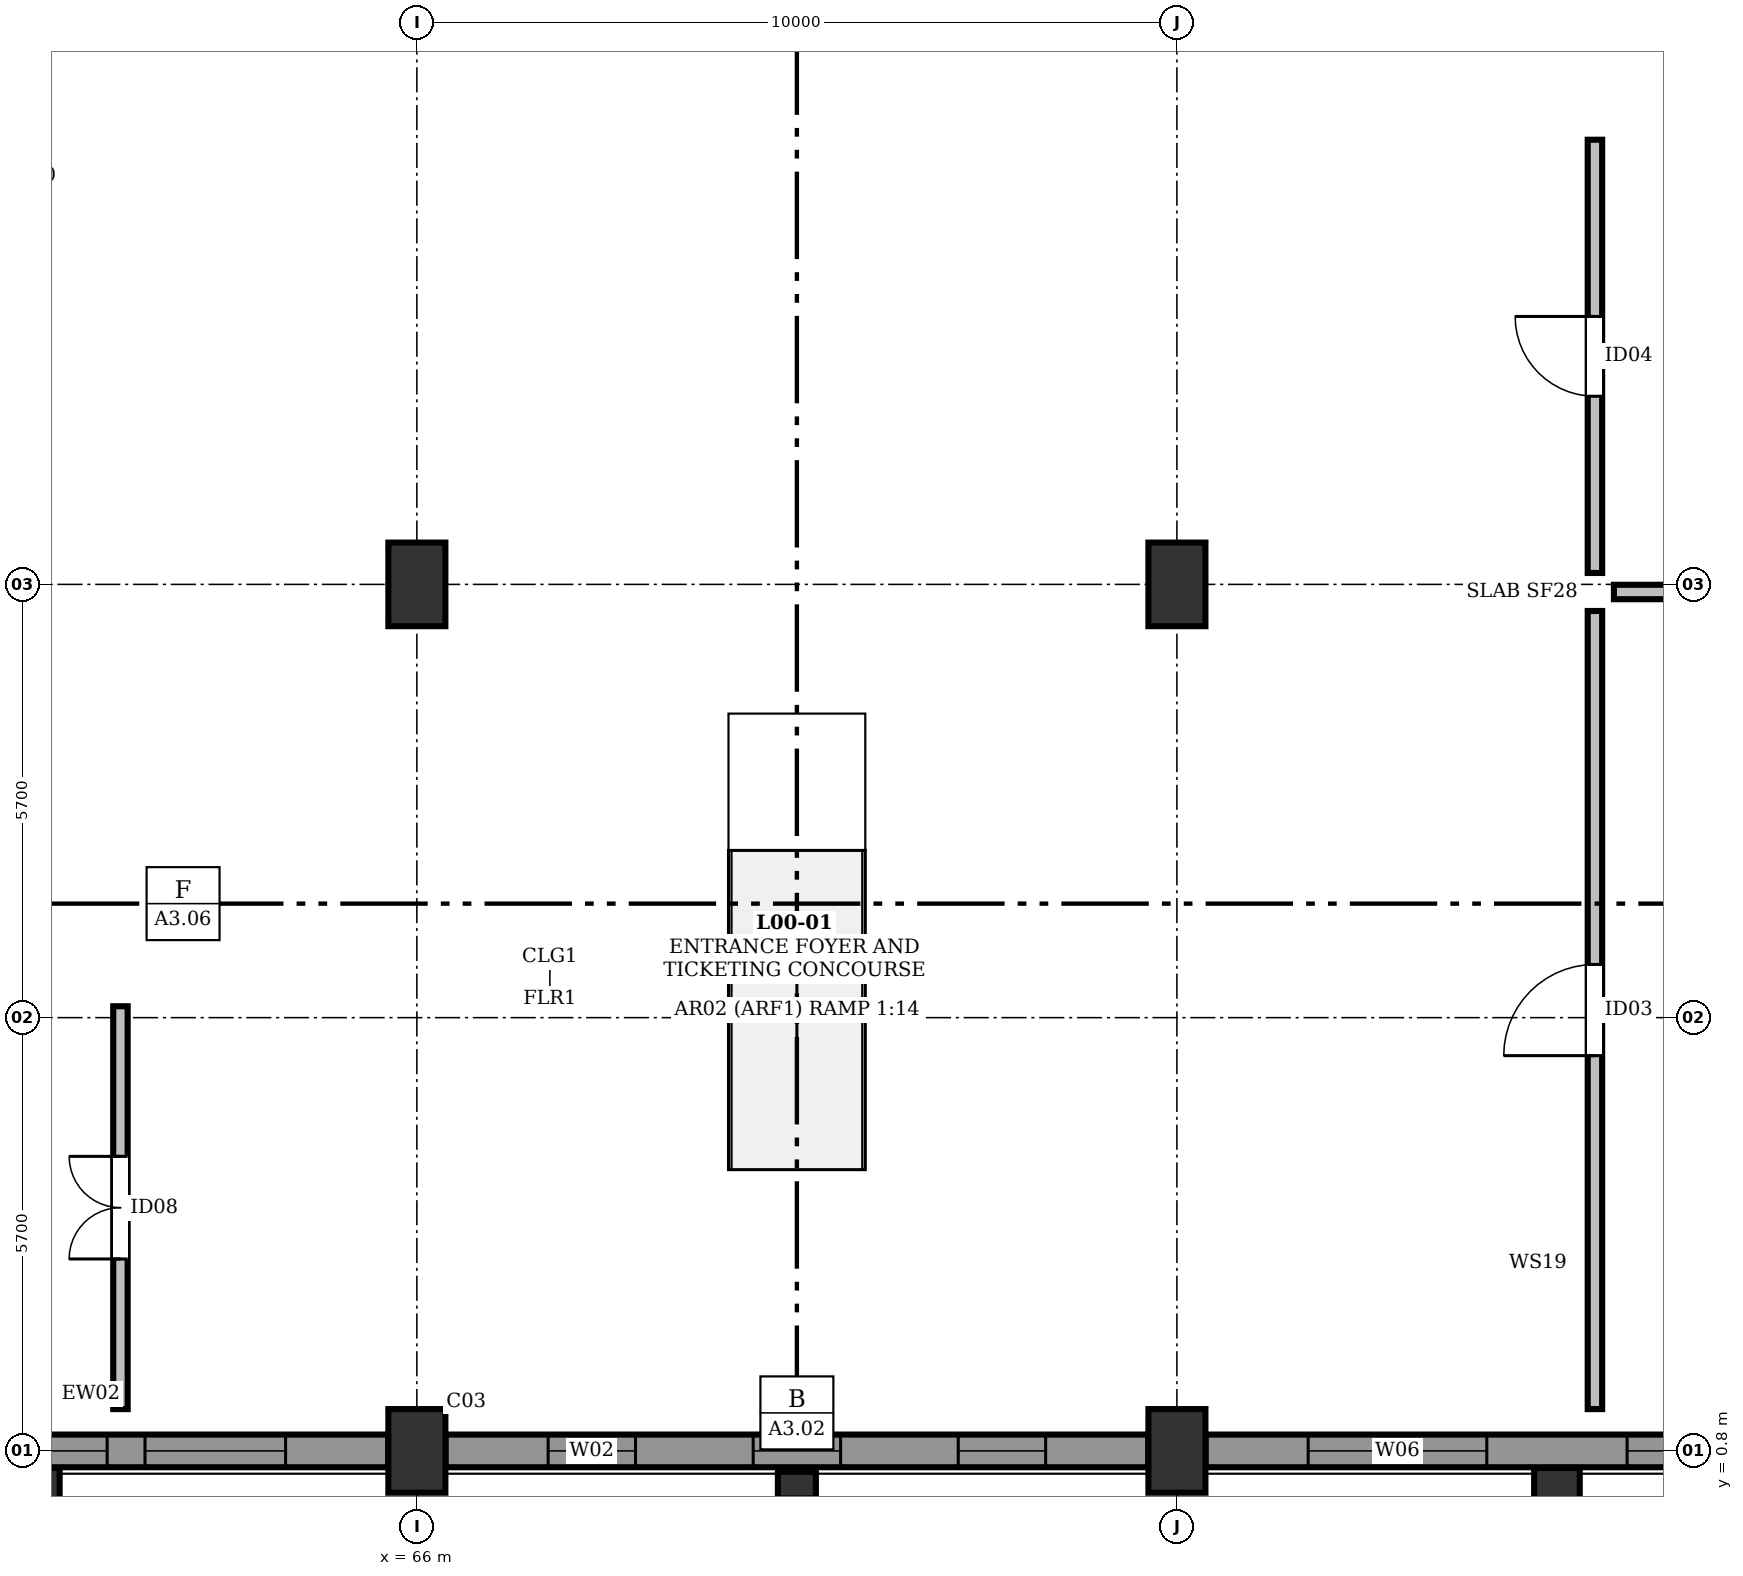
"""IFC4 building model, lengths in metres.
Left out: names, types, materials, properties, quantities, classifications, styles, units other than length and angle.
Written with IfcOpenShell. Run it as: python <this file> out.ifc"""

import sys

from ifc_helpers import new_model, si_unit, direction, frame, frame_2d, origin, origin_2d, place, context, subcontext, project, spatial, rectangle, extrude, element, fill, save


model = new_model("IFC4")
c1 = context("Model", 3, precision=1e-05, world=origin(), true_north=direction((0.0, 1.0)))
c2 = subcontext(c1, "Body", "Model", "MODEL_VIEW")
j1 = project(units=[si_unit("LENGTHUNIT", "METRE"), si_unit("PLANEANGLEUNIT", "RADIAN")], contexts=[c1])
p1 = place(None, origin())
s1 = spatial("IfcSite", under=j1, at=p1, CompositionType="ELEMENT")
p2 = place(p1, origin())
s2 = spatial("IfcBuilding", under=s1, at=p2, CompositionType="ELEMENT")
p3 = place(p2, origin())
s3 = spatial("IfcBuildingStorey", under=s2, at=p3, CompositionType="ELEMENT", Elevation=0.0)
for number, where, z_axis, x_axis in (
    (1, (66.0, 0.8, 0.0), (0.0, 0.0, 1.0), (1.0, 0.0, 0.0)),
    (2, (66.0, 12.2, 0.0), (0.0, 0.0, 1.0), (1.0, 0.0, 0.0)),
    (3, (76.0, 0.8, 0.0), (0.0, 0.0, 1.0), (1.0, 0.0, 0.0)),
    (4, (76.0, 12.2, 0.0), (0.0, 0.0, 1.0), (1.0, 0.0, 0.0)),
):
    element("IfcColumn", number, at=place(p3, frame(where, z_axis=z_axis, x_axis=x_axis)), inside=s3, PredefinedType="COLUMN", context=c2, shape_type="SweptSolid", body=[
        extrude(rectangle(XDim=0.75, YDim=1.1, at=origin_2d()), origin(), (0.0, 0.0, 1.0), 5.4),
    ])
p4 = place(p3, frame((61.0, 0.35, 0.0), z_axis=(0.0, 0.0, 1.0), x_axis=(0.0, 1.0, 0.0)))
e5 = element("IfcColumn", 5, at=p4, inside=s3, PredefinedType="PILASTER", context=c2, shape_type="SweptSolid", body=[
    extrude(rectangle(XDim=0.45, YDim=0.6, at=origin_2d()), origin(), (0.0, 0.0, 1.0), 5.4),
])
p5 = place(p3, frame((71.0, 0.35, 0.0), z_axis=(0.0, 0.0, 1.0), x_axis=(0.0, 1.0, 0.0)))
e6 = element("IfcColumn", 6, at=p5, inside=s3, PredefinedType="PILASTER", context=c2, shape_type="SweptSolid", body=[
    extrude(rectangle(XDim=0.35, YDim=0.5, at=origin_2d()), origin(), (0.0, 0.0, 1.0), 5.4),
])
p6 = place(p3, frame((81.0, 0.35, 0.0), z_axis=(0.0, 0.0, 1.0), x_axis=(0.0, 1.0, 0.0)))
e7 = element("IfcColumn", 7, at=p6, inside=s3, PredefinedType="PILASTER", context=c2, shape_type="SweptSolid", body=[
    extrude(rectangle(XDim=0.45, YDim=0.6, at=origin_2d()), origin(), (0.0, 0.0, 1.0), 5.4),
])
p7 = place(p3, frame((56.377, 0.8, 0.0), z_axis=(0.0, 0.0, 1.0), x_axis=(1.0, 0.0, 0.0)))
e8 = element("IfcWall", 8, at=p7, inside=s3, PredefinedType="STANDARD", context=c2, shape_type="SweptSolid", body=[
    extrude(rectangle(XDim=9.246, YDim=0.43, at=frame_2d((4.623, 0.0))), origin(), (0.0, 0.0, 1.0), 4.612),
])
p8 = place(p7, frame((1.35, 0.0, 0.75)))
e9 = element("IfcOpeningElement", 9, at=p8, cuts=e8, PredefinedType="OPENING", context=c2, shape_type="SweptSolid", body=[
    extrude(rectangle(XDim=1.85, YDim=2.5, at=frame_2d((0.925, 1.25))), frame((0.0, 0.227, 0.0), z_axis=(0.0, -1.0, 0.0), x_axis=(1.0, 0.0, 0.0)), (0.0, 0.0, 1.0), 0.454),
])
p9 = place(p7, frame((3.698, 0.0, 0.75)))
e10 = element("IfcOpeningElement", 10, at=p9, cuts=e8, PredefinedType="OPENING", context=c2, shape_type="SweptSolid", body=[
    extrude(rectangle(XDim=1.85, YDim=2.5, at=frame_2d((0.925, 1.25))), frame((0.0, 0.227, 0.0), z_axis=(0.0, -1.0, 0.0), x_axis=(1.0, 0.0, 0.0)), (0.0, 0.0, 1.0), 0.454),
])
p10 = place(p7, frame((6.046, 0.0, 0.75)))
e11 = element("IfcOpeningElement", 11, at=p10, cuts=e8, PredefinedType="OPENING", context=c2, shape_type="SweptSolid", body=[
    extrude(rectangle(XDim=1.85, YDim=2.5, at=frame_2d((0.925, 1.25))), frame((0.0, 0.227, 0.0), z_axis=(0.0, -1.0, 0.0), x_axis=(1.0, 0.0, 0.0)), (0.0, 0.0, 1.0), 0.454),
])
p11 = place(p3, frame((66.377, 0.8, 0.0), z_axis=(0.0, 0.0, 1.0), x_axis=(1.0, 0.0, 0.0)))
e12 = element("IfcWall", 12, at=p11, inside=s3, PredefinedType="STANDARD", context=c2, shape_type="SweptSolid", body=[
    extrude(rectangle(XDim=9.246, YDim=0.43, at=frame_2d((4.623, 0.0))), origin(), (0.0, 0.0, 1.0), 4.612),
])
p12 = place(p11, frame((1.35, 0.0, 0.75)))
e13 = element("IfcOpeningElement", 13, at=p12, cuts=e12, PredefinedType="OPENING", context=c2, shape_type="SweptSolid", body=[
    extrude(rectangle(XDim=1.15, YDim=1.75, at=frame_2d((0.575, 0.875))), frame((0.0, 0.227, 0.0), z_axis=(0.0, -1.0, 0.0), x_axis=(1.0, 0.0, 0.0)), (0.0, 0.0, 1.0), 0.454),
])
p13 = place(p11, frame((4.048, 0.0, 0.75)))
e14 = element("IfcOpeningElement", 14, at=p13, cuts=e12, PredefinedType="OPENING", context=c2, shape_type="SweptSolid", body=[
    extrude(rectangle(XDim=1.15, YDim=1.75, at=frame_2d((0.575, 0.875))), frame((0.0, 0.227, 0.0), z_axis=(0.0, -1.0, 0.0), x_axis=(1.0, 0.0, 0.0)), (0.0, 0.0, 1.0), 0.454),
])
p14 = place(p11, frame((6.746, 0.0, 0.75)))
e15 = element("IfcOpeningElement", 15, at=p14, cuts=e12, PredefinedType="OPENING", context=c2, shape_type="SweptSolid", body=[
    extrude(rectangle(XDim=1.15, YDim=1.75, at=frame_2d((0.575, 0.875))), frame((0.0, 0.227, 0.0), z_axis=(0.0, -1.0, 0.0), x_axis=(1.0, 0.0, 0.0)), (0.0, 0.0, 1.0), 0.454),
])
p15 = place(p3, frame((76.377, 0.8, 0.0), z_axis=(0.0, 0.0, 1.0), x_axis=(1.0, 0.0, 0.0)))
e16 = element("IfcWall", 16, at=p15, inside=s3, PredefinedType="STANDARD", context=c2, shape_type="SweptSolid", body=[
    extrude(rectangle(XDim=9.246, YDim=0.43, at=frame_2d((4.623, 0.0))), origin(), (0.0, 0.0, 1.0), 4.612),
])
p16 = place(p15, frame((1.35, 0.0, 0.75)))
e17 = element("IfcOpeningElement", 17, at=p16, cuts=e16, PredefinedType="OPENING", context=c2, shape_type="SweptSolid", body=[
    extrude(rectangle(XDim=2.35, YDim=1.75, at=frame_2d((1.175, 0.875))), frame((0.0, 0.227, 0.0), z_axis=(0.0, -1.0, 0.0), x_axis=(1.0, 0.0, 0.0)), (0.0, 0.0, 1.0), 0.454),
])
p17 = place(p15, frame((5.546, 0.0, 0.75)))
e18 = element("IfcOpeningElement", 18, at=p17, cuts=e16, PredefinedType="OPENING", context=c2, shape_type="SweptSolid", body=[
    extrude(rectangle(XDim=2.35, YDim=1.75, at=frame_2d((1.175, 0.875))), frame((0.0, 0.227, 0.0), z_axis=(0.0, -1.0, 0.0), x_axis=(1.0, 0.0, 0.0)), (0.0, 0.0, 1.0), 0.454),
])
p18 = place(p3, frame((62.1, 1.35, 0.0), z_axis=(0.0, 0.0, 1.0), x_axis=(0.0, 1.0, 0.0)))
e19 = element("IfcWall", 19, at=p18, inside=s3, PredefinedType="SOLIDWALL", context=c2, shape_type="SweptSolid", body=[
    extrude(rectangle(XDim=5.3, YDim=0.19, at=frame_2d((2.65, 0.0))), origin(), (0.0, 0.0, 1.0), 5.16),
])
p19 = place(p18, frame((1.975, 0.0, 0.0)))
e20 = element("IfcOpeningElement", 20, at=p19, cuts=e19, PredefinedType="OPENING", context=c2, shape_type="SweptSolid", body=[
    extrude(rectangle(XDim=1.35, YDim=2.2, at=frame_2d((0.675, 1.1))), frame((0.0, 0.107, 0.0), z_axis=(0.0, -1.0, 0.0), x_axis=(1.0, 0.0, 0.0)), (0.0, 0.0, 1.0), 0.214),
])
p20 = place(p3, frame((81.5, 1.35, 0.0), z_axis=(0.0, 0.0, 1.0), x_axis=(0.0, 1.0, 0.0)))
e21 = element("IfcWall", 21, at=p20, inside=s3, PredefinedType="SOLIDWALL", context=c2, shape_type="SweptSolid", body=[
    extrude(rectangle(XDim=10.5, YDim=0.19, at=frame_2d((5.25, 0.0))), origin(), (0.0, 0.0, 1.0), 4.245),
])
p21 = place(p20, frame((4.65, 0.0, 0.0)))
e22 = element("IfcOpeningElement", 22, at=p21, cuts=e21, PredefinedType="OPENING", context=c2, shape_type="SweptSolid", body=[
    extrude(rectangle(XDim=1.2, YDim=2.15, at=frame_2d((0.6, 1.075))), frame((0.0, 0.107, 0.0), z_axis=(0.0, -1.0, 0.0), x_axis=(1.0, 0.0, 0.0)), (0.0, 0.0, 1.0), 0.214),
])
p22 = place(p3, frame((81.5, 12.35, 0.0), z_axis=(0.0, 0.0, 1.0), x_axis=(0.0, 1.0, 0.0)))
e23 = element("IfcWall", 23, at=p22, inside=s3, PredefinedType="SOLIDWALL", context=c2, shape_type="SweptSolid", body=[
    extrude(rectangle(XDim=5.7, YDim=0.19, at=frame_2d((2.85, 0.0))), origin(), (0.0, 0.0, 1.0), 4.245),
])
p23 = place(p22, frame((2.325, 0.0, 0.0)))
e24 = element("IfcOpeningElement", 24, at=p23, cuts=e23, PredefinedType="OPENING", context=c2, shape_type="SweptSolid", body=[
    extrude(rectangle(XDim=1.05, YDim=2.15, at=frame_2d((0.525, 1.075))), frame((0.0, 0.107, 0.0), z_axis=(0.0, -1.0, 0.0), x_axis=(1.0, 0.0, 0.0)), (0.0, 0.0, 1.0), 0.214),
])
p24 = place(p3, frame((81.75, 12.1, 0.0), z_axis=(0.0, 0.0, 1.0), x_axis=(1.0, 0.0, 0.0)))
e25 = element("IfcWall", 25, at=p24, inside=s3, PredefinedType="SOLIDWALL", context=c2, shape_type="SweptSolid", body=[
    extrude(rectangle(XDim=3.873, YDim=0.19, at=frame_2d((1.937, 0.0))), origin(), (0.0, 0.0, 1.0), 4.245),
])
p25 = place(p9, origin())
e26 = element("IfcWindow", 26, at=p25, inside=s3, PartitioningType="DOUBLE_PANEL_VERTICAL", PredefinedType="WINDOW", context=c2, shape_type="SweptSolid", body=[
    extrude(rectangle(XDim=1.85, YDim=2.5, at=frame_2d((0.925, 1.25))), frame((0.0, 0.08, 0.0), z_axis=(0.0, -1.0, 0.0), x_axis=(1.0, 0.0, 0.0)), (0.0, 0.0, 1.0), 0.06),
])
fill(e10, e26)
p26 = place(p10, origin())
e27 = element("IfcWindow", 27, at=p26, inside=s3, PartitioningType="DOUBLE_PANEL_VERTICAL", PredefinedType="WINDOW", context=c2, shape_type="SweptSolid", body=[
    extrude(rectangle(XDim=1.85, YDim=2.5, at=frame_2d((0.925, 1.25))), frame((0.0, 0.08, 0.0), z_axis=(0.0, -1.0, 0.0), x_axis=(1.0, 0.0, 0.0)), (0.0, 0.0, 1.0), 0.06),
])
fill(e11, e27)
p27 = place(p12, origin())
e28 = element("IfcWindow", 28, at=p27, inside=s3, PartitioningType="SINGLE_PANEL", PredefinedType="WINDOW", context=c2, shape_type="SweptSolid", body=[
    extrude(rectangle(XDim=1.15, YDim=1.75, at=frame_2d((0.575, 0.875))), frame((0.0, 0.08, 0.0), z_axis=(0.0, -1.0, 0.0), x_axis=(1.0, 0.0, 0.0)), (0.0, 0.0, 1.0), 0.06),
])
fill(e13, e28)
p28 = place(p13, origin())
e29 = element("IfcWindow", 29, at=p28, inside=s3, PartitioningType="SINGLE_PANEL", PredefinedType="WINDOW", context=c2, shape_type="SweptSolid", body=[
    extrude(rectangle(XDim=1.15, YDim=1.75, at=frame_2d((0.575, 0.875))), frame((0.0, 0.08, 0.0), z_axis=(0.0, -1.0, 0.0), x_axis=(1.0, 0.0, 0.0)), (0.0, 0.0, 1.0), 0.06),
])
fill(e14, e29)
p29 = place(p14, origin())
e30 = element("IfcWindow", 30, at=p29, inside=s3, PartitioningType="SINGLE_PANEL", PredefinedType="WINDOW", context=c2, shape_type="SweptSolid", body=[
    extrude(rectangle(XDim=1.15, YDim=1.75, at=frame_2d((0.575, 0.875))), frame((0.0, 0.08, 0.0), z_axis=(0.0, -1.0, 0.0), x_axis=(1.0, 0.0, 0.0)), (0.0, 0.0, 1.0), 0.06),
])
fill(e15, e30)
p30 = place(p16, origin())
e31 = element("IfcWindow", 31, at=p30, inside=s3, PartitioningType="TRIPLE_PANEL_VERTICAL", PredefinedType="WINDOW", context=c2, shape_type="SweptSolid", body=[
    extrude(rectangle(XDim=2.35, YDim=1.75, at=frame_2d((1.175, 0.875))), frame((0.0, 0.08, 0.0), z_axis=(0.0, -1.0, 0.0), x_axis=(1.0, 0.0, 0.0)), (0.0, 0.0, 1.0), 0.06),
])
fill(e17, e31)
p31 = place(p17, origin())
e32 = element("IfcWindow", 32, at=p31, inside=s3, PartitioningType="TRIPLE_PANEL_VERTICAL", PredefinedType="WINDOW", context=c2, shape_type="SweptSolid", body=[
    extrude(rectangle(XDim=2.35, YDim=1.75, at=frame_2d((1.175, 0.875))), frame((0.0, 0.08, 0.0), z_axis=(0.0, -1.0, 0.0), x_axis=(1.0, 0.0, 0.0)), (0.0, 0.0, 1.0), 0.06),
])
fill(e18, e32)
p32 = place(p19, origin())
e33 = element("IfcDoor", 33, at=p32, inside=s3, OperationType="DOUBLE_DOOR_SINGLE_SWING", PredefinedType="DOOR", context=c2, shape_type="SweptSolid", body=[
    extrude(rectangle(XDim=1.35, YDim=2.2, at=frame_2d((0.675, 1.1))), frame((0.0, 0.025, 0.0), z_axis=(0.0, -1.0, 0.0), x_axis=(1.0, 0.0, 0.0)), (0.0, 0.0, 1.0), 0.05),
])
fill(e20, e33)
p33 = place(p21, origin())
e34 = element("IfcDoor", 34, at=p33, inside=s3, OperationType="SINGLE_SWING_LEFT", PredefinedType="DOOR", context=c2, shape_type="SweptSolid", body=[
    extrude(rectangle(XDim=1.2, YDim=2.15, at=frame_2d((0.6, 1.075))), frame((0.0, 0.025, 0.0), z_axis=(0.0, -1.0, 0.0), x_axis=(1.0, 0.0, 0.0)), (0.0, 0.0, 1.0), 0.05),
])
fill(e22, e34)
p34 = place(p23, origin())
e35 = element("IfcDoor", 35, at=p34, inside=s3, OperationType="SINGLE_SWING_RIGHT", PredefinedType="DOOR", context=c2, shape_type="SweptSolid", body=[
    extrude(rectangle(XDim=1.05, YDim=2.15, at=frame_2d((0.525, 1.075))), frame((0.0, 0.025, 0.0), z_axis=(0.0, -1.0, 0.0), x_axis=(1.0, 0.0, 0.0)), (0.0, 0.0, 1.0), 0.05),
])
fill(e24, e35)
save(model, sys.argv[1])
